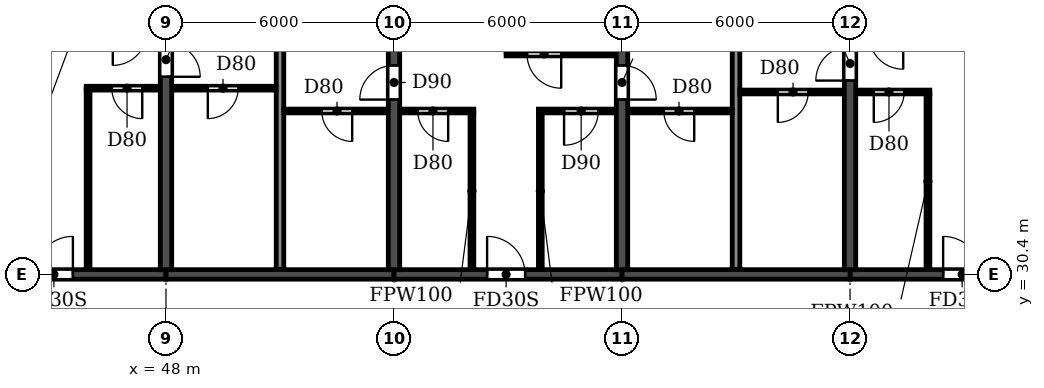
"""IFC4 building model, lengths in metres.
Left out: names, types, materials, properties, quantities, classifications, styles, units other than length and angle.
Written with IfcOpenShell. Run it as: python <this file> out.ifc"""

import sys

from ifc_helpers import new_model, si_unit, direction, frame, frame_2d, origin, place, context, subcontext, project, spatial, rectangle, extrude, element, fill, save


model = new_model("IFC4")
c1 = context("Model", 3, precision=1e-05, world=origin(), true_north=direction((0.0, 1.0)))
c2 = subcontext(c1, "Body", "Model", "MODEL_VIEW")
j1 = project(units=[si_unit("LENGTHUNIT", "METRE"), si_unit("PLANEANGLEUNIT", "RADIAN")], contexts=[c1])
p1 = place(None, origin())
s1 = spatial("IfcSite", under=j1, at=p1, CompositionType="ELEMENT")
p2 = place(p1, origin())
s2 = spatial("IfcBuilding", under=s1, at=p2, CompositionType="ELEMENT")
p3 = place(p2, frame((0.0, 0.0, 132.3)))
s3 = spatial("IfcBuildingStorey", under=s2, at=p3, CompositionType="ELEMENT", Elevation=132.3)
p4 = place(p3, frame((48.0, 30.525, 0.0), z_axis=(0.0, 0.0, 1.0), x_axis=(0.0, 1.0, 0.0)))
e1 = element("IfcWall", 1, at=p4, inside=s3, PredefinedType="SHEAR", context=c2, shape_type="SweptSolid", body=[
    extrude(rectangle(XDim=11.675, YDim=0.3, at=frame_2d((5.837, 0.0))), origin(), (0.0, 0.0, 1.0), 3.07),
])
p5 = place(p4, frame((5.075, 0.0, 0.0)))
e2 = element("IfcOpeningElement", 2, at=p5, cuts=e1, PredefinedType="OPENING", context=c2, shape_type="SweptSolid", body=[
    extrude(rectangle(XDim=0.9, YDim=2.1, at=frame_2d((0.45, 1.05))), frame((0.0, 0.16, 0.0), z_axis=(0.0, -1.0, 0.0), x_axis=(1.0, 0.0, 0.0)), (0.0, 0.0, 1.0), 0.32),
])
p6 = place(p3, frame((54.0, 30.525, 0.0), z_axis=(0.0, 0.0, 1.0), x_axis=(0.0, 1.0, 0.0)))
e3 = element("IfcWall", 3, at=p6, inside=s3, PredefinedType="SHEAR", context=c2, shape_type="SweptSolid", body=[
    extrude(rectangle(XDim=11.675, YDim=0.3, at=frame_2d((5.837, 0.0))), origin(), (0.0, 0.0, 1.0), 3.07),
])
p7 = place(p6, frame((4.475, 0.0, 0.0)))
e4 = element("IfcOpeningElement", 4, at=p7, cuts=e3, PredefinedType="OPENING", context=c2, shape_type="SweptSolid", body=[
    extrude(rectangle(XDim=0.9, YDim=2.1, at=frame_2d((0.45, 1.05))), frame((0.0, 0.16, 0.0), z_axis=(0.0, -1.0, 0.0), x_axis=(1.0, 0.0, 0.0)), (0.0, 0.0, 1.0), 0.32),
])
p8 = place(p3, frame((60.0, 30.525, 0.0), z_axis=(0.0, 0.0, 1.0), x_axis=(0.0, 1.0, 0.0)))
e5 = element("IfcWall", 5, at=p8, inside=s3, PredefinedType="SHEAR", context=c2, shape_type="SweptSolid", body=[
    extrude(rectangle(XDim=11.675, YDim=0.3, at=frame_2d((5.837, 0.0))), origin(), (0.0, 0.0, 1.0), 3.07),
])
p9 = place(p8, frame((4.475, 0.0, 0.0)))
e6 = element("IfcOpeningElement", 6, at=p9, cuts=e5, PredefinedType="OPENING", context=c2, shape_type="SweptSolid", body=[
    extrude(rectangle(XDim=0.9, YDim=2.1, at=frame_2d((0.45, 1.05))), frame((0.0, 0.16, 0.0), z_axis=(0.0, -1.0, 0.0), x_axis=(1.0, 0.0, 0.0)), (0.0, 0.0, 1.0), 0.32),
])
p10 = place(p3, frame((66.0, 30.525, 0.0), z_axis=(0.0, 0.0, 1.0), x_axis=(0.0, 1.0, 0.0)))
e7 = element("IfcWall", 7, at=p10, inside=s3, PredefinedType="SHEAR", context=c2, shape_type="SweptSolid", body=[
    extrude(rectangle(XDim=11.675, YDim=0.3, at=frame_2d((5.837, 0.0))), origin(), (0.0, 0.0, 1.0), 3.07),
])
p11 = place(p10, frame((4.975, 0.0, 0.0)))
e8 = element("IfcOpeningElement", 8, at=p11, cuts=e7, PredefinedType="OPENING", context=c2, shape_type="SweptSolid", body=[
    extrude(rectangle(XDim=0.9, YDim=2.1, at=frame_2d((0.45, 1.05))), frame((0.0, 0.16, 0.0), z_axis=(0.0, -1.0, 0.0), x_axis=(1.0, 0.0, 0.0)), (0.0, 0.0, 1.0), 0.32),
])
p12 = place(p3, frame((42.0, 30.4, 0.0), z_axis=(0.0, 0.0, 1.0), x_axis=(1.0, 0.0, 0.0)))
e9 = element("IfcWall", 9, at=p12, inside=s3, PredefinedType="SHEAR", context=c2, shape_type="SweptSolid", body=[
    extrude(rectangle(XDim=6.0, YDim=0.25, at=frame_2d((3.0, 0.0))), origin(), (0.0, 0.0, 1.0), 2.47),
])
p13 = place(p12, frame((2.55, 0.0, 0.0)))
e10 = element("IfcOpeningElement", 10, at=p13, cuts=e9, PredefinedType="OPENING", context=c2, shape_type="SweptSolid", body=[
    extrude(rectangle(XDim=1.0, YDim=2.1, at=frame_2d((0.5, 1.05))), frame((0.0, 0.135, 0.0), z_axis=(0.0, -1.0, 0.0), x_axis=(1.0, 0.0, 0.0)), (0.0, 0.0, 1.0), 0.27),
])
p14 = place(p3, frame((48.0, 30.4, 0.0), z_axis=(0.0, 0.0, 1.0), x_axis=(1.0, 0.0, 0.0)))
e11 = element("IfcWall", 11, at=p14, inside=s3, PredefinedType="SHEAR", context=c2, shape_type="SweptSolid", body=[
    extrude(rectangle(XDim=6.0, YDim=0.25, at=frame_2d((3.0, 0.0))), origin(), (0.0, 0.0, 1.0), 2.47),
])
p15 = place(p3, frame((54.0, 30.4, 0.0), z_axis=(0.0, 0.0, 1.0), x_axis=(1.0, 0.0, 0.0)))
e12 = element("IfcWall", 12, at=p15, inside=s3, PredefinedType="SHEAR", context=c2, shape_type="SweptSolid", body=[
    extrude(rectangle(XDim=6.0, YDim=0.25, at=frame_2d((3.0, 0.0))), origin(), (0.0, 0.0, 1.0), 2.47),
])
p16 = place(p15, frame((2.45, 0.0, 0.0)))
e13 = element("IfcOpeningElement", 13, at=p16, cuts=e12, PredefinedType="OPENING", context=c2, shape_type="SweptSolid", body=[
    extrude(rectangle(XDim=1.0, YDim=2.1, at=frame_2d((0.5, 1.05))), frame((0.0, 0.135, 0.0), z_axis=(0.0, -1.0, 0.0), x_axis=(1.0, 0.0, 0.0)), (0.0, 0.0, 1.0), 0.27),
])
p17 = place(p3, frame((60.0, 30.4, 0.0), z_axis=(0.0, 0.0, 1.0), x_axis=(1.0, 0.0, 0.0)))
e14 = element("IfcWall", 14, at=p17, inside=s3, PredefinedType="SHEAR", context=c2, shape_type="SweptSolid", body=[
    extrude(rectangle(XDim=6.0, YDim=0.25, at=frame_2d((3.0, 0.0))), origin(), (0.0, 0.0, 1.0), 2.47),
])
p18 = place(p3, frame((66.0, 30.4, 0.0), z_axis=(0.0, 0.0, 1.0), x_axis=(1.0, 0.0, 0.0)))
e15 = element("IfcWall", 15, at=p18, inside=s3, PredefinedType="SHEAR", context=c2, shape_type="SweptSolid", body=[
    extrude(rectangle(XDim=6.0, YDim=0.25, at=frame_2d((3.0, 0.0))), origin(), (0.0, 0.0, 1.0), 2.47),
])
p19 = place(p18, frame((2.45, 0.0, 0.0)))
e16 = element("IfcOpeningElement", 16, at=p19, cuts=e15, PredefinedType="OPENING", context=c2, shape_type="SweptSolid", body=[
    extrude(rectangle(XDim=1.0, YDim=2.1, at=frame_2d((0.5, 1.05))), frame((0.0, 0.135, 0.0), z_axis=(0.0, -1.0, 0.0), x_axis=(1.0, 0.0, 0.0)), (0.0, 0.0, 1.0), 0.27),
])
for number, where, z_axis, x_axis in (
    (17, (51.0, 30.535, 0.0), (0.0, 0.0, 1.0), (0.0, 1.0, 0.0)),
    (18, (63.0, 30.535, 0.0), (0.0, 0.0, 1.0), (0.0, 1.0, 0.0)),
):
    element("IfcWall", number, at=place(p3, frame(where, z_axis=z_axis, x_axis=x_axis)), inside=s3, PredefinedType="PARTITIONING", context=c2, shape_type="SweptSolid", body=[
        extrude(rectangle(XDim=11.805, YDim=0.2, at=frame_2d((5.903, 0.0))), origin(), (0.0, 0.0, 1.0), 3.07),
    ])
p20 = place(p3, frame((51.1, 34.7, 0.0), z_axis=(0.0, 0.0, 1.0), x_axis=(1.0, 0.0, 0.0)))
e19 = element("IfcWall", 19, at=p20, inside=s3, PredefinedType="PARTITIONING", context=c2, shape_type="SweptSolid", body=[
    extrude(rectangle(XDim=2.74, YDim=0.1, at=frame_2d((1.37, 0.0))), origin(), (0.0, 0.0, 1.0), 3.07),
])
p21 = place(p20, frame((1.0, 0.0, 0.0)))
e20 = element("IfcOpeningElement", 20, at=p21, cuts=e19, PredefinedType="OPENING", context=c2, shape_type="SweptSolid", body=[
    extrude(rectangle(XDim=0.8, YDim=2.1, at=frame_2d((0.4, 1.05))), frame((0.0, 0.06, 0.0), z_axis=(0.0, -1.0, 0.0), x_axis=(1.0, 0.0, 0.0)), (0.0, 0.0, 1.0), 0.12),
])
p22 = place(p3, frame((54.16, 34.7, 0.0), z_axis=(0.0, 0.0, 1.0), x_axis=(1.0, 0.0, 0.0)))
e21 = element("IfcWall", 21, at=p22, inside=s3, PredefinedType="PARTITIONING", context=c2, shape_type="SweptSolid", body=[
    extrude(rectangle(XDim=1.94, YDim=0.1, at=frame_2d((0.97, 0.0))), origin(), (0.0, 0.0, 1.0), 3.07),
])
p23 = place(p22, frame((0.465, 0.0, 0.0)))
e22 = element("IfcOpeningElement", 22, at=p23, cuts=e21, PredefinedType="OPENING", context=c2, shape_type="SweptSolid", body=[
    extrude(rectangle(XDim=0.8, YDim=2.1, at=frame_2d((0.4, 1.05))), frame((0.0, 0.06, 0.0), z_axis=(0.0, -1.0, 0.0), x_axis=(1.0, 0.0, 0.0)), (0.0, 0.0, 1.0), 0.12),
])
p24 = place(p3, frame((57.8, 34.7, 0.0), z_axis=(0.0, 0.0, 1.0), x_axis=(1.0, 0.0, 0.0)))
e23 = element("IfcWall", 23, at=p24, inside=s3, PredefinedType="PARTITIONING", context=c2, shape_type="SweptSolid", body=[
    extrude(rectangle(XDim=2.04, YDim=0.1, at=frame_2d((1.02, 0.0))), origin(), (0.0, 0.0, 1.0), 3.07),
])
p25 = place(p24, frame((0.675, 0.0, 0.0)))
e24 = element("IfcOpeningElement", 24, at=p25, cuts=e23, PredefinedType="OPENING", context=c2, shape_type="SweptSolid", body=[
    extrude(rectangle(XDim=0.9, YDim=2.1, at=frame_2d((0.45, 1.05))), frame((0.0, 0.06, 0.0), z_axis=(0.0, -1.0, 0.0), x_axis=(1.0, 0.0, 0.0)), (0.0, 0.0, 1.0), 0.12),
])
p26 = place(p3, frame((60.16, 34.7, 0.0), z_axis=(0.0, 0.0, 1.0), x_axis=(1.0, 0.0, 0.0)))
e25 = element("IfcWall", 25, at=p26, inside=s3, PredefinedType="PARTITIONING", context=c2, shape_type="SweptSolid", body=[
    extrude(rectangle(XDim=2.74, YDim=0.1, at=frame_2d((1.37, 0.0))), origin(), (0.0, 0.0, 1.0), 3.07),
])
p27 = place(p26, frame((0.94, 0.0, 0.0)))
e26 = element("IfcOpeningElement", 26, at=p27, cuts=e25, PredefinedType="OPENING", context=c2, shape_type="SweptSolid", body=[
    extrude(rectangle(XDim=0.8, YDim=2.1, at=frame_2d((0.4, 1.05))), frame((0.0, 0.06, 0.0), z_axis=(0.0, -1.0, 0.0), x_axis=(1.0, 0.0, 0.0)), (0.0, 0.0, 1.0), 0.12),
])
p28 = place(p3, frame((63.1, 35.2, 0.0), z_axis=(0.0, 0.0, 1.0), x_axis=(1.0, 0.0, 0.0)))
e27 = element("IfcWall", 27, at=p28, inside=s3, PredefinedType="PARTITIONING", context=c2, shape_type="SweptSolid", body=[
    extrude(rectangle(XDim=2.74, YDim=0.1, at=frame_2d((1.37, 0.0))), origin(), (0.0, 0.0, 1.0), 3.07),
])
p29 = place(p28, frame((1.0, 0.0, 0.0)))
e28 = element("IfcOpeningElement", 28, at=p29, cuts=e27, PredefinedType="OPENING", context=c2, shape_type="SweptSolid", body=[
    extrude(rectangle(XDim=0.8, YDim=2.1, at=frame_2d((0.4, 1.05))), frame((0.0, 0.06, 0.0), z_axis=(0.0, -1.0, 0.0), x_axis=(1.0, 0.0, 0.0)), (0.0, 0.0, 1.0), 0.12),
])
p30 = place(p3, frame((66.16, 35.2, 0.0), z_axis=(0.0, 0.0, 1.0), x_axis=(1.0, 0.0, 0.0)))
e29 = element("IfcWall", 29, at=p30, inside=s3, PredefinedType="PARTITIONING", context=c2, shape_type="SweptSolid", body=[
    extrude(rectangle(XDim=1.94, YDim=0.1, at=frame_2d((0.97, 0.0))), origin(), (0.0, 0.0, 1.0), 3.07),
])
p31 = place(p30, frame((0.465, 0.0, 0.0)))
e30 = element("IfcOpeningElement", 30, at=p31, cuts=e29, PredefinedType="OPENING", context=c2, shape_type="SweptSolid", body=[
    extrude(rectangle(XDim=0.8, YDim=2.1, at=frame_2d((0.4, 1.05))), frame((0.0, 0.06, 0.0), z_axis=(0.0, -1.0, 0.0), x_axis=(1.0, 0.0, 0.0)), (0.0, 0.0, 1.0), 0.12),
])
p32 = place(p3, frame((45.9, 35.3, 0.0), z_axis=(0.0, 0.0, 1.0), x_axis=(1.0, 0.0, 0.0)))
e31 = element("IfcWall", 31, at=p32, inside=s3, PredefinedType="PARTITIONING", context=c2, shape_type="SweptSolid", body=[
    extrude(rectangle(XDim=1.94, YDim=0.1, at=frame_2d((0.97, 0.0))), origin(), (0.0, 0.0, 1.0), 3.07),
])
p33 = place(p32, frame((0.675, 0.0, 0.0)))
e32 = element("IfcOpeningElement", 32, at=p33, cuts=e31, PredefinedType="OPENING", context=c2, shape_type="SweptSolid", body=[
    extrude(rectangle(XDim=0.8, YDim=2.1, at=frame_2d((0.4, 1.05))), frame((0.0, 0.06, 0.0), z_axis=(0.0, -1.0, 0.0), x_axis=(1.0, 0.0, 0.0)), (0.0, 0.0, 1.0), 0.12),
])
p34 = place(p3, frame((48.16, 35.3, 0.0), z_axis=(0.0, 0.0, 1.0), x_axis=(1.0, 0.0, 0.0)))
e33 = element("IfcWall", 33, at=p34, inside=s3, PredefinedType="PARTITIONING", context=c2, shape_type="SweptSolid", body=[
    extrude(rectangle(XDim=2.74, YDim=0.1, at=frame_2d((1.37, 0.0))), origin(), (0.0, 0.0, 1.0), 3.07),
])
p35 = place(p34, frame((0.94, 0.0, 0.0)))
e34 = element("IfcOpeningElement", 34, at=p35, cuts=e33, PredefinedType="OPENING", context=c2, shape_type="SweptSolid", body=[
    extrude(rectangle(XDim=0.8, YDim=2.1, at=frame_2d((0.4, 1.05))), frame((0.0, 0.06, 0.0), z_axis=(0.0, -1.0, 0.0), x_axis=(1.0, 0.0, 0.0)), (0.0, 0.0, 1.0), 0.12),
])
p36 = place(p3, frame((56.95, 36.2, 0.0), z_axis=(0.0, 0.0, 1.0), x_axis=(1.0, 0.0, 0.0)))
e35 = element("IfcWall", 35, at=p36, inside=s3, PredefinedType="PARTITIONING", context=c2, shape_type="SweptSolid", body=[
    extrude(rectangle(XDim=2.89, YDim=0.1, at=frame_2d((1.445, 0.0))), origin(), (0.0, 0.0, 1.0), 3.07),
])
p37 = place(p36, frame((0.55, 0.0, 0.0)))
e36 = element("IfcOpeningElement", 36, at=p37, cuts=e35, PredefinedType="OPENING", context=c2, shape_type="SweptSolid", body=[
    extrude(rectangle(XDim=0.9, YDim=2.1, at=frame_2d((0.45, 1.05))), frame((0.0, 0.06, 0.0), z_axis=(0.0, -1.0, 0.0), x_axis=(1.0, 0.0, 0.0)), (0.0, 0.0, 1.0), 0.12),
])
p38 = place(p3, frame((45.95, 30.535, 0.0), z_axis=(0.0, 0.0, 1.0), x_axis=(0.0, 1.0, 0.0)))
e37 = element("IfcWall", 37, at=p38, inside=s3, PredefinedType="PARTITIONING", context=c2, shape_type="SweptSolid", body=[
    extrude(rectangle(XDim=4.715, YDim=0.1, at=frame_2d((2.357, 0.0))), origin(), (0.0, 0.0, 1.0), 3.07),
])
p39 = place(p3, frame((56.05, 30.535, 0.0), z_axis=(0.0, 0.0, 1.0), x_axis=(0.0, 1.0, 0.0)))
e38 = element("IfcWall", 38, at=p39, inside=s3, PredefinedType="PARTITIONING", context=c2, shape_type="SweptSolid", body=[
    extrude(rectangle(XDim=4.115, YDim=0.1, at=frame_2d((2.058, 0.0))), origin(), (0.0, 0.0, 1.0), 3.07),
])
p40 = place(p3, frame((57.0, 36.25, 0.0), z_axis=(0.0, 0.0, 1.0), x_axis=(0.0, 1.0, 0.0)))
e39 = element("IfcWall", 39, at=p40, inside=s3, PredefinedType="PARTITIONING", context=c2, shape_type="SweptSolid", body=[
    extrude(rectangle(XDim=6.09, YDim=0.1, at=frame_2d((3.045, 0.0))), origin(), (0.0, 0.0, 1.0), 3.07),
])
p41 = place(p3, frame((57.85, 30.535, 0.0), z_axis=(0.0, 0.0, 1.0), x_axis=(0.0, 1.0, 0.0)))
e40 = element("IfcWall", 40, at=p41, inside=s3, PredefinedType="PARTITIONING", context=c2, shape_type="SweptSolid", body=[
    extrude(rectangle(XDim=4.115, YDim=0.1, at=frame_2d((2.058, 0.0))), origin(), (0.0, 0.0, 1.0), 3.07),
])
p42 = place(p3, frame((68.05, 30.535, 0.0), z_axis=(0.0, 0.0, 1.0), x_axis=(0.0, 1.0, 0.0)))
e41 = element("IfcWall", 41, at=p42, inside=s3, PredefinedType="PARTITIONING", context=c2, shape_type="SweptSolid", body=[
    extrude(rectangle(XDim=4.615, YDim=0.1, at=frame_2d((2.308, 0.0))), origin(), (0.0, 0.0, 1.0), 3.07),
])
p43 = place(p35, frame((0.8, 0.0, 0.0), z_axis=(0.0, 0.0, 1.0), x_axis=(-1.0, 0.0, 0.0)))
e42 = element("IfcDoor", 42, at=p43, inside=s3, OperationType="SINGLE_SWING_RIGHT", PredefinedType="DOOR", context=c2, shape_type="SweptSolid", body=[
    extrude(rectangle(XDim=0.8, YDim=2.1, at=frame_2d((0.4, 1.05))), frame((0.0, 0.025, 0.0), z_axis=(0.0, -1.0, 0.0), x_axis=(1.0, 0.0, 0.0)), (0.0, 0.0, 1.0), 0.05),
])
fill(e34, e42)
p44 = place(p13, origin())
e43 = element("IfcDoor", 43, at=p44, inside=s3, OperationType="SINGLE_SWING_RIGHT", PredefinedType="DOOR", context=c2, shape_type="SweptSolid", body=[
    extrude(rectangle(XDim=1.0, YDim=2.1, at=frame_2d((0.5, 1.05))), frame((0.0, 0.025, 0.0), z_axis=(0.0, -1.0, 0.0), x_axis=(1.0, 0.0, 0.0)), (0.0, 0.0, 1.0), 0.05),
])
fill(e10, e43)
p45 = place(p33, frame((0.8, 0.0, 0.0), z_axis=(0.0, 0.0, 1.0), x_axis=(-1.0, 0.0, 0.0)))
e44 = element("IfcDoor", 44, at=p45, inside=s3, OperationType="SINGLE_SWING_LEFT", PredefinedType="DOOR", context=c2, shape_type="SweptSolid", body=[
    extrude(rectangle(XDim=0.8, YDim=2.1, at=frame_2d((0.4, 1.05))), frame((0.0, 0.025, 0.0), z_axis=(0.0, -1.0, 0.0), x_axis=(1.0, 0.0, 0.0)), (0.0, 0.0, 1.0), 0.05),
])
fill(e32, e44)
p46 = place(p5, frame((0.9, 0.0, 0.0), z_axis=(0.0, 0.0, 1.0), x_axis=(-1.0, 0.0, 0.0)))
e45 = element("IfcDoor", 45, at=p46, inside=s3, OperationType="SINGLE_SWING_RIGHT", PredefinedType="DOOR", context=c2, shape_type="SweptSolid", body=[
    extrude(rectangle(XDim=0.9, YDim=2.1, at=frame_2d((0.45, 1.05))), frame((0.0, 0.025, 0.0), z_axis=(0.0, -1.0, 0.0), x_axis=(1.0, 0.0, 0.0)), (0.0, 0.0, 1.0), 0.05),
])
fill(e2, e45)
p47 = place(p21, frame((0.8, 0.0, 0.0), z_axis=(0.0, 0.0, 1.0), x_axis=(-1.0, 0.0, 0.0)))
e46 = element("IfcDoor", 46, at=p47, inside=s3, OperationType="SINGLE_SWING_LEFT", PredefinedType="DOOR", context=c2, shape_type="SweptSolid", body=[
    extrude(rectangle(XDim=0.8, YDim=2.1, at=frame_2d((0.4, 1.05))), frame((0.0, 0.025, 0.0), z_axis=(0.0, -1.0, 0.0), x_axis=(1.0, 0.0, 0.0)), (0.0, 0.0, 1.0), 0.05),
])
fill(e20, e46)
p48 = place(p27, frame((0.8, 0.0, 0.0), z_axis=(0.0, 0.0, 1.0), x_axis=(-1.0, 0.0, 0.0)))
e47 = element("IfcDoor", 47, at=p48, inside=s3, OperationType="SINGLE_SWING_LEFT", PredefinedType="DOOR", context=c2, shape_type="SweptSolid", body=[
    extrude(rectangle(XDim=0.8, YDim=2.1, at=frame_2d((0.4, 1.05))), frame((0.0, 0.025, 0.0), z_axis=(0.0, -1.0, 0.0), x_axis=(1.0, 0.0, 0.0)), (0.0, 0.0, 1.0), 0.05),
])
fill(e26, e47)
p49 = place(p7, origin())
e48 = element("IfcDoor", 48, at=p49, inside=s3, OperationType="SINGLE_SWING_LEFT", PredefinedType="DOOR", context=c2, shape_type="SweptSolid", body=[
    extrude(rectangle(XDim=0.9, YDim=2.1, at=frame_2d((0.45, 1.05))), frame((0.0, 0.025, 0.0), z_axis=(0.0, -1.0, 0.0), x_axis=(1.0, 0.0, 0.0)), (0.0, 0.0, 1.0), 0.05),
])
fill(e4, e48)
p50 = place(p23, frame((0.8, 0.0, 0.0), z_axis=(0.0, 0.0, 1.0), x_axis=(-1.0, 0.0, 0.0)))
e49 = element("IfcDoor", 49, at=p50, inside=s3, OperationType="SINGLE_SWING_LEFT", PredefinedType="DOOR", context=c2, shape_type="SweptSolid", body=[
    extrude(rectangle(XDim=0.8, YDim=2.1, at=frame_2d((0.4, 1.05))), frame((0.0, 0.025, 0.0), z_axis=(0.0, -1.0, 0.0), x_axis=(1.0, 0.0, 0.0)), (0.0, 0.0, 1.0), 0.05),
])
fill(e22, e49)
p51 = place(p16, origin())
e50 = element("IfcDoor", 50, at=p51, inside=s3, OperationType="SINGLE_SWING_LEFT", PredefinedType="DOOR", context=c2, shape_type="SweptSolid", body=[
    extrude(rectangle(XDim=1.0, YDim=2.1, at=frame_2d((0.5, 1.05))), frame((0.0, 0.025, 0.0), z_axis=(0.0, -1.0, 0.0), x_axis=(1.0, 0.0, 0.0)), (0.0, 0.0, 1.0), 0.05),
])
fill(e13, e50)
p52 = place(p37, frame((0.9, 0.0, 0.0), z_axis=(0.0, 0.0, 1.0), x_axis=(-1.0, 0.0, 0.0)))
e51 = element("IfcDoor", 51, at=p52, inside=s3, OperationType="SINGLE_SWING_LEFT", PredefinedType="DOOR", context=c2, shape_type="SweptSolid", body=[
    extrude(rectangle(XDim=0.9, YDim=2.1, at=frame_2d((0.45, 1.05))), frame((0.0, 0.025, 0.0), z_axis=(0.0, -1.0, 0.0), x_axis=(1.0, 0.0, 0.0)), (0.0, 0.0, 1.0), 0.05),
])
fill(e36, e51)
p53 = place(p25, frame((0.9, 0.0, 0.0), z_axis=(0.0, 0.0, 1.0), x_axis=(-1.0, 0.0, 0.0)))
e52 = element("IfcDoor", 52, at=p53, inside=s3, OperationType="SINGLE_SWING_RIGHT", PredefinedType="DOOR", context=c2, shape_type="SweptSolid", body=[
    extrude(rectangle(XDim=0.9, YDim=2.1, at=frame_2d((0.45, 1.05))), frame((0.0, 0.025, 0.0), z_axis=(0.0, -1.0, 0.0), x_axis=(1.0, 0.0, 0.0)), (0.0, 0.0, 1.0), 0.05),
])
fill(e24, e52)
p54 = place(p9, frame((0.9, 0.0, 0.0), z_axis=(0.0, 0.0, 1.0), x_axis=(-1.0, 0.0, 0.0)))
e53 = element("IfcDoor", 53, at=p54, inside=s3, OperationType="SINGLE_SWING_RIGHT", PredefinedType="DOOR", context=c2, shape_type="SweptSolid", body=[
    extrude(rectangle(XDim=0.9, YDim=2.1, at=frame_2d((0.45, 1.05))), frame((0.0, 0.025, 0.0), z_axis=(0.0, -1.0, 0.0), x_axis=(1.0, 0.0, 0.0)), (0.0, 0.0, 1.0), 0.05),
])
fill(e6, e53)
p55 = place(p29, frame((0.8, 0.0, 0.0), z_axis=(0.0, 0.0, 1.0), x_axis=(-1.0, 0.0, 0.0)))
e54 = element("IfcDoor", 54, at=p55, inside=s3, OperationType="SINGLE_SWING_RIGHT", PredefinedType="DOOR", context=c2, shape_type="SweptSolid", body=[
    extrude(rectangle(XDim=0.8, YDim=2.1, at=frame_2d((0.4, 1.05))), frame((0.0, 0.025, 0.0), z_axis=(0.0, -1.0, 0.0), x_axis=(1.0, 0.0, 0.0)), (0.0, 0.0, 1.0), 0.05),
])
fill(e28, e54)
p56 = place(p11, origin())
e55 = element("IfcDoor", 55, at=p56, inside=s3, OperationType="SINGLE_SWING_LEFT", PredefinedType="DOOR", context=c2, shape_type="SweptSolid", body=[
    extrude(rectangle(XDim=0.9, YDim=2.1, at=frame_2d((0.45, 1.05))), frame((0.0, 0.025, 0.0), z_axis=(0.0, -1.0, 0.0), x_axis=(1.0, 0.0, 0.0)), (0.0, 0.0, 1.0), 0.05),
])
fill(e8, e55)
p57 = place(p31, frame((0.8, 0.0, 0.0), z_axis=(0.0, 0.0, 1.0), x_axis=(-1.0, 0.0, 0.0)))
e56 = element("IfcDoor", 56, at=p57, inside=s3, OperationType="SINGLE_SWING_RIGHT", PredefinedType="DOOR", context=c2, shape_type="SweptSolid", body=[
    extrude(rectangle(XDim=0.8, YDim=2.1, at=frame_2d((0.4, 1.05))), frame((0.0, 0.025, 0.0), z_axis=(0.0, -1.0, 0.0), x_axis=(1.0, 0.0, 0.0)), (0.0, 0.0, 1.0), 0.05),
])
fill(e30, e56)
p58 = place(p19, origin())
e57 = element("IfcDoor", 57, at=p58, inside=s3, OperationType="SINGLE_SWING_LEFT", PredefinedType="DOOR", context=c2, shape_type="SweptSolid", body=[
    extrude(rectangle(XDim=1.0, YDim=2.1, at=frame_2d((0.5, 1.05))), frame((0.0, 0.025, 0.0), z_axis=(0.0, -1.0, 0.0), x_axis=(1.0, 0.0, 0.0)), (0.0, 0.0, 1.0), 0.05),
])
fill(e16, e57)
save(model, sys.argv[1])
